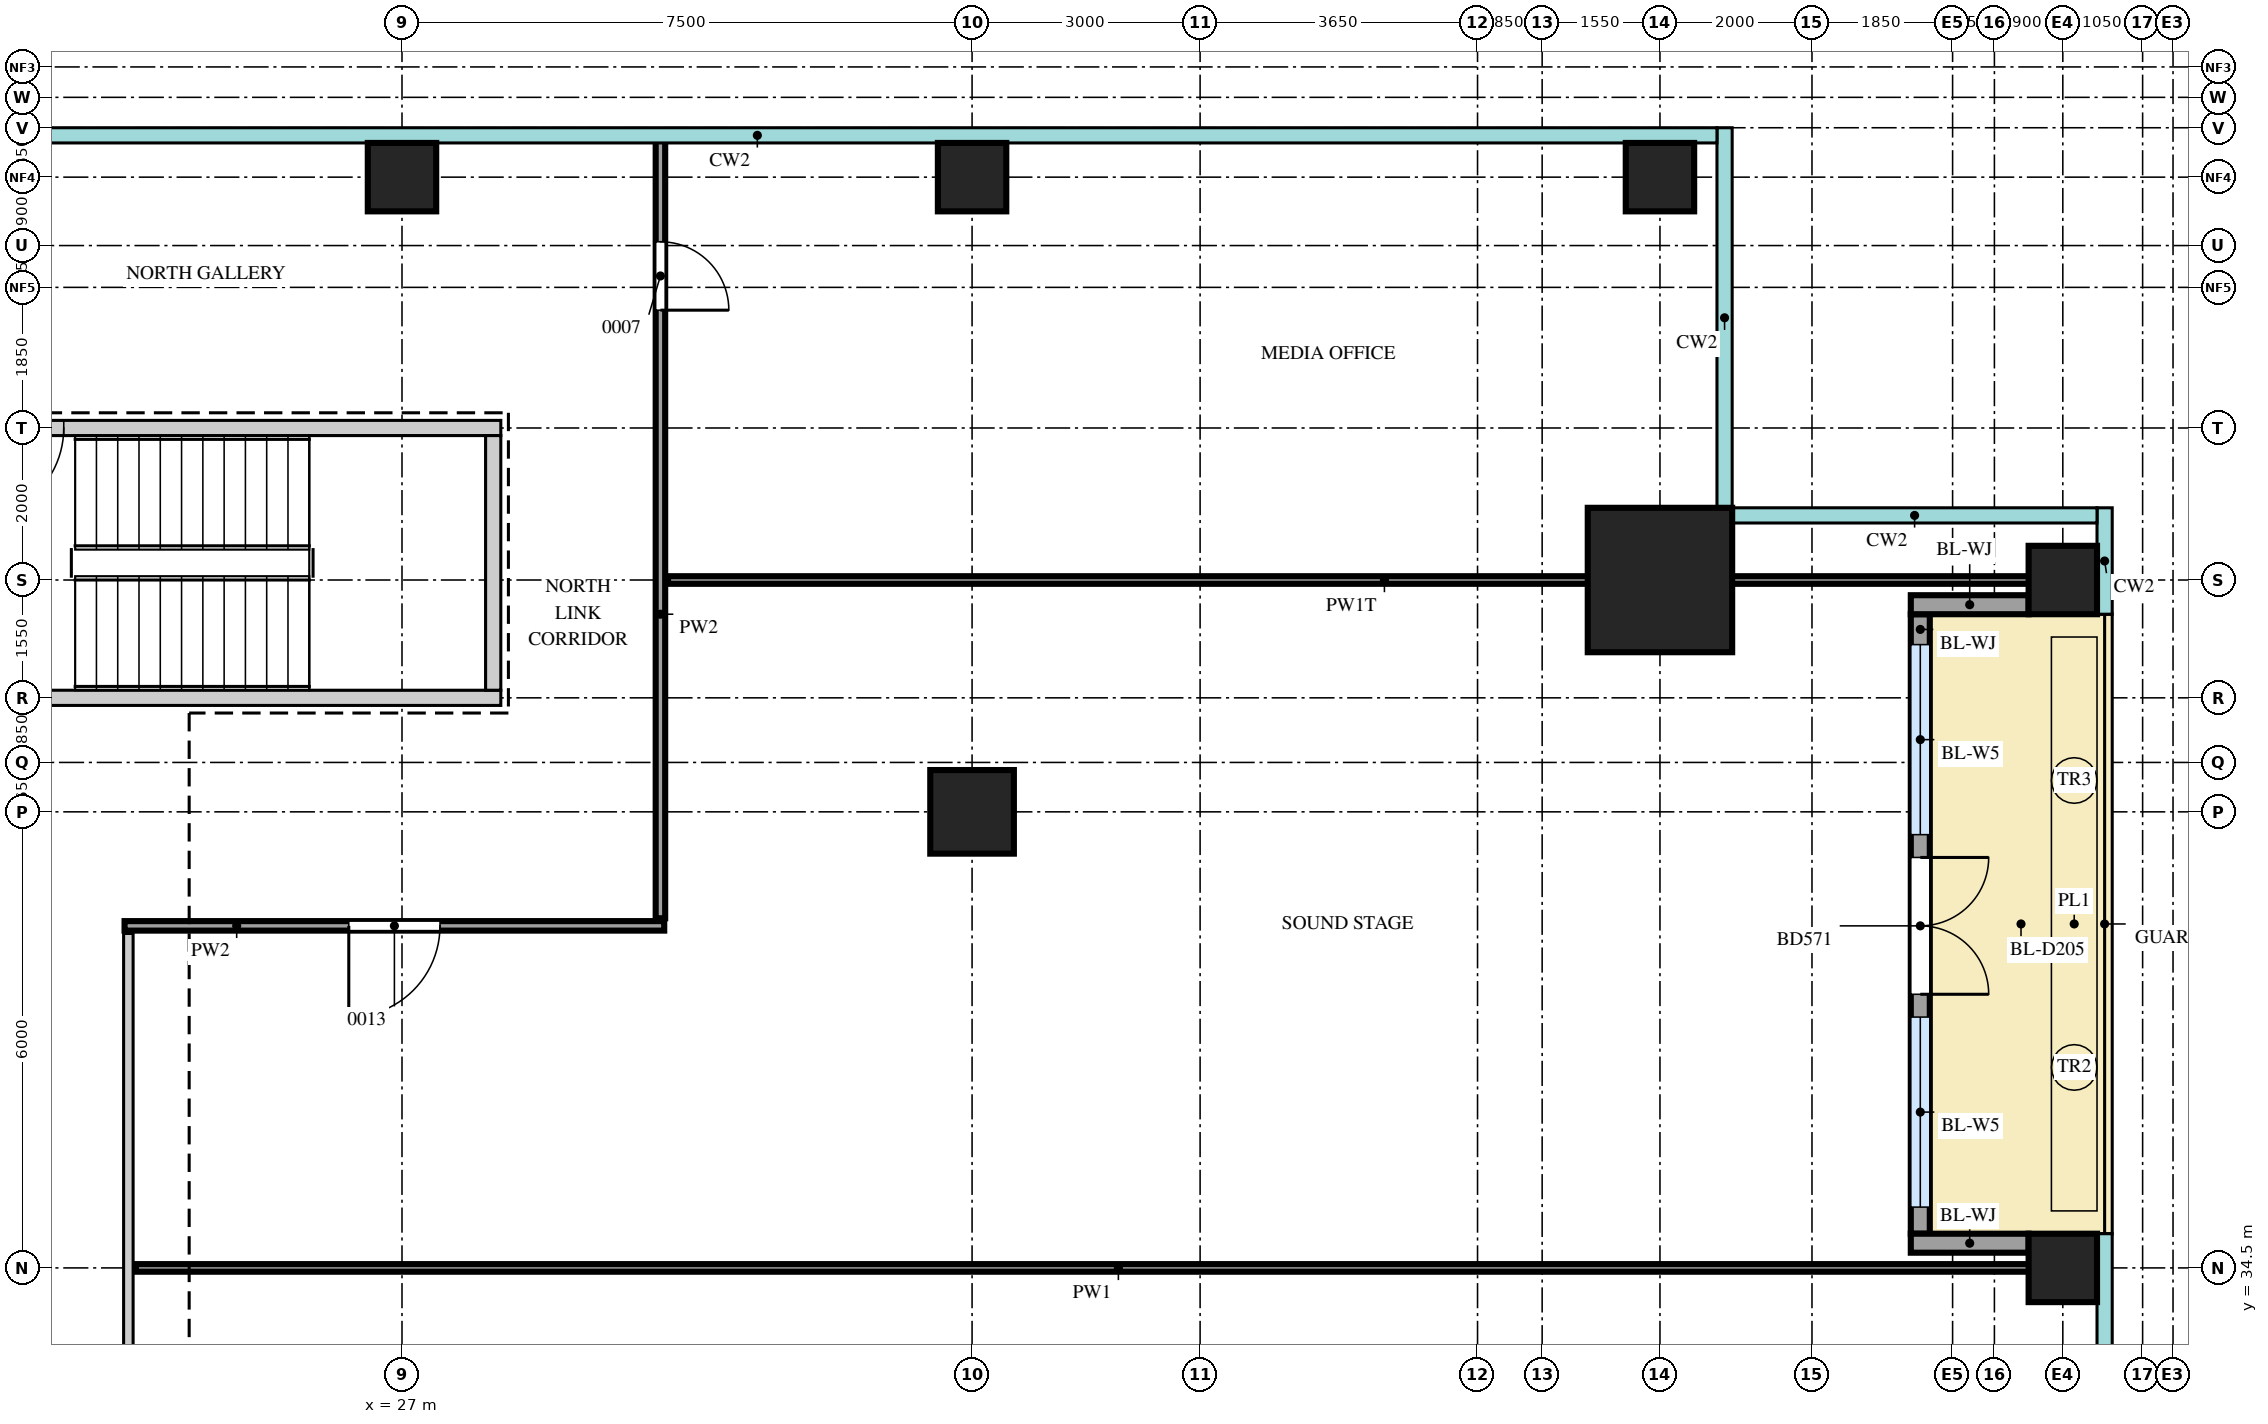
"""IFC4 building model, lengths in metres.
Left out: names, types, materials, properties, quantities, classifications, styles, units other than length and angle.
Written with IfcOpenShell. Run it as: python <this file> out.ifc"""

import sys

from ifc_helpers import new_model, si_unit, direction, frame, frame_2d, origin, origin_2d, place, context, subcontext, project, spatial, rectangle, extrude, source, transform, mapped, element, fill, save


model = new_model("IFC4")
c1 = context("Model", 3, precision=1e-05, world=origin(), true_north=direction((0.0, 1.0)))
c2 = subcontext(c1, "Body", "Model", "MODEL_VIEW")
j1 = project(units=[si_unit("LENGTHUNIT", "METRE"), si_unit("PLANEANGLEUNIT", "RADIAN")], contexts=[c1])
p1 = place(None, origin())
s1 = spatial("IfcSite", under=j1, at=p1, CompositionType="ELEMENT")
p2 = place(p1, origin())
s2 = spatial("IfcBuilding", under=s1, at=p2, CompositionType="ELEMENT")
p3 = place(p2, frame((0.0, 0.0, 254.2)))
s3 = spatial("IfcBuildingStorey", under=s2, at=p3, CompositionType="ELEMENT", Elevation=254.2)
m1 = source(origin(), c2, "Body", "SweptSolid", [
    extrude(rectangle(XDim=7.1, YDim=0.2, at=frame_2d((3.55, 0.0))), origin(), (0.0, 0.0, 1.0), 3.75),
])
p4 = place(p3, frame((21.2, 45.55, 0.0), z_axis=(0.0, 0.0, 1.0), x_axis=(1.0, 0.0, 0.0)))
e1 = element("IfcWall", 1, at=p4, inside=s3, PredefinedType="SHEAR", context=c2, shape_type="MappedRepresentation", body=[
    mapped(m1, transform((0.0, 0.0, 0.0))),
])
m2 = source(origin(), c2, "Body", "SweptSolid", [
    extrude(rectangle(XDim=1.2, YDim=2.1, at=frame_2d((0.6, 1.05))), frame((0.0, 0.11, 0.0), z_axis=(0.0, -1.0, 0.0), x_axis=(1.0, 0.0, 0.0)), (0.0, 0.0, 1.0), 0.22),
])
p5 = place(p4, frame((0.15, 0.0, 0.0)))
e2 = element("IfcOpeningElement", 2, at=p5, cuts=e1, PredefinedType="OPENING", context=c2, shape_type="MappedRepresentation", body=[
    mapped(m2, transform((0.0, 0.0, 0.0))),
])
p6 = place(p3, frame((21.2, 42.0, 0.0), z_axis=(0.0, 0.0, 1.0), x_axis=(1.0, 0.0, 0.0)))
e3 = element("IfcWall", 3, at=p6, inside=s3, PredefinedType="SHEAR", context=c2, shape_type="MappedRepresentation", body=[
    mapped(m1, transform((0.0, 0.0, 0.0))),
])
m3 = source(origin(), c2, "Body", "SweptSolid", [
    extrude(rectangle(XDim=3.35, YDim=0.2, at=frame_2d((1.675, 0.0))), origin(), (0.0, 0.0, 1.0), 3.75),
])
p7 = place(p3, frame((28.2, 42.1, 0.0), z_axis=(0.0, 0.0, 1.0), x_axis=(0.0, 1.0, 0.0)))
e4 = element("IfcWall", 4, at=p7, inside=s3, PredefinedType="SHEAR", context=c2, shape_type="MappedRepresentation", body=[
    mapped(m3, transform((0.0, 0.0, 0.0))),
])
m4 = source(origin(), c2, "Body", "SweptSolid", [
    extrude(rectangle(XDim=1.9, YDim=1.9, at=origin_2d()), origin(), (0.0, 0.0, 1.0), 4.0),
])
p8 = place(p3, frame((43.55, 43.55, 0.0), z_axis=(0.0, 0.0, 1.0), x_axis=(1.0, 0.0, 0.0)))
e5 = element("IfcColumn", 5, at=p8, inside=s3, PredefinedType="COLUMN", context=c2, shape_type="MappedRepresentation", body=[
    mapped(m4, transform((0.0, 0.0, 0.0))),
])
m5 = source(origin(), c2, "Body", "SweptSolid", [
    extrude(rectangle(XDim=0.9, YDim=0.9, at=origin_2d()), origin(), (0.0, 0.0, 1.0), 3.75),
])
for number, where, z_axis, x_axis in (
    (6, (48.85, 34.5, 0.0), (0.0, 0.0, 1.0), (1.0, 0.0, 0.0)),
    (7, (48.85, 43.55, 0.0), (0.0, 0.0, 1.0), (1.0, 0.0, 0.0)),
    (8, (27.0, 48.85, 0.0), (0.0, 0.0, 1.0), (1.0, 0.0, 0.0)),
    (9, (34.5, 48.85, 0.0), (0.0, 0.0, 1.0), (1.0, 0.0, 0.0)),
    (10, (43.55, 48.85, 0.0), (0.0, 0.0, 1.0), (1.0, 0.0, 0.0)),
):
    element("IfcColumn", number, at=place(p3, frame(where, z_axis=z_axis, x_axis=x_axis)), inside=s3, PredefinedType="COLUMN", context=c2, shape_type="MappedRepresentation", body=[
        mapped(m5, transform((0.0, 0.0, 0.0))),
    ])
m6 = source(origin(), c2, "Body", "SweptSolid", [
    extrude(rectangle(XDim=1.1, YDim=1.1, at=origin_2d()), origin(), (0.0, 0.0, 1.0), 3.75),
])
p9 = place(p3, frame((34.5, 40.5, 0.0), z_axis=(0.0, 0.0, 1.0), x_axis=(1.0, 0.0, 0.0)))
e11 = element("IfcColumn", 11, at=p9, inside=s3, PredefinedType="COLUMN", context=c2, shape_type="MappedRepresentation", body=[
    mapped(m6, transform((0.0, 0.0, 0.0))),
])
m7 = source(origin(), c2, "Body", "SweptSolid", [
    extrude(rectangle(XDim=8.15, YDim=0.25, at=frame_2d((4.075, 0.0))), origin(), (0.0, 0.0, 1.0), 3.2),
])
p10 = place(p3, frame((46.975, 34.95, 0.0), z_axis=(0.0, 0.0, 1.0), x_axis=(0.0, 1.0, 0.0)))
e12 = element("IfcWall", 12, at=p10, inside=s3, PredefinedType="SOLIDWALL", context=c2, shape_type="MappedRepresentation", body=[
    mapped(m7, transform((0.0, 0.0, 0.0))),
])
m8 = source(origin(), c2, "Body", "SweptSolid", [
    extrude(rectangle(XDim=2.5, YDim=2.4, at=frame_2d((1.25, 1.2))), frame((0.0, 0.135, 0.0), z_axis=(0.0, -1.0, 0.0), x_axis=(1.0, 0.0, 0.0)), (0.0, 0.0, 1.0), 0.27),
])
p11 = place(p10, frame((0.35, 0.0, 0.0)))
e13 = element("IfcOpeningElement", 13, at=p11, cuts=e12, PredefinedType="OPENING", context=c2, shape_type="MappedRepresentation", body=[
    mapped(m8, transform((0.0, 0.0, 0.0))),
])
p12 = place(p10, frame((5.25, 0.0, 0.0)))
e14 = element("IfcOpeningElement", 14, at=p12, cuts=e12, PredefinedType="OPENING", context=c2, shape_type="MappedRepresentation", body=[
    mapped(m8, transform((0.0, 0.0, 0.0))),
])
m9 = source(origin(), c2, "Body", "SweptSolid", [
    extrude(rectangle(XDim=1.8, YDim=2.4, at=frame_2d((0.9, 1.2))), frame((0.0, 0.135, 0.0), z_axis=(0.0, -1.0, 0.0), x_axis=(1.0, 0.0, 0.0)), (0.0, 0.0, 1.0), 0.27),
])
p13 = place(p10, frame((3.15, 0.0, 0.0)))
e15 = element("IfcOpeningElement", 15, at=p13, cuts=e12, PredefinedType="OPENING", context=c2, shape_type="MappedRepresentation", body=[
    mapped(m9, transform((0.0, 0.0, 0.0))),
])
m10 = source(origin(), c2, "Body", "SweptSolid", [
    extrude(rectangle(XDim=1.55, YDim=0.25, at=frame_2d((0.775, 0.0))), origin(), (0.0, 0.0, 1.0), 3.2),
])
for number, where, z_axis, x_axis in (
    (16, (48.4, 34.825, 0.0), (0.0, 0.0, 1.0), (-1.0, 0.0, 0.0)),
    (17, (48.4, 43.225, 0.0), (0.0, 0.0, 1.0), (-1.0, 0.0, 0.0)),
):
    element("IfcWall", number, at=place(p3, frame(where, z_axis=z_axis, x_axis=x_axis)), inside=s3, PredefinedType="SOLIDWALL", context=c2, shape_type="MappedRepresentation", body=[
        mapped(m10, transform((0.0, 0.0, 0.0))),
    ])
m11 = source(origin(), c2, "Body", "SweptSolid", [
    extrude(rectangle(XDim=20.8, YDim=0.125, at=frame_2d((10.4, 0.0))), origin(), (0.0, 0.0, 1.0), 3.8),
])
p14 = place(p3, frame((23.4, 18.1, 0.0), z_axis=(0.0, 0.0, 1.0), x_axis=(0.0, 1.0, 0.0)))
e18 = element("IfcWall", 18, at=p14, inside=s3, PredefinedType="PARTITIONING", context=c2, shape_type="MappedRepresentation", body=[
    mapped(m11, transform((0.0, 0.0, 0.0))),
])
m12 = source(origin(), c2, "Body", "SweptSolid", [
    extrude(rectangle(XDim=1.2, YDim=2.1, at=frame_2d((0.6, 1.05))), frame((0.0, 0.073, 0.0), z_axis=(0.0, -1.0, 0.0), x_axis=(1.0, 0.0, 0.0)), (0.0, 0.0, 1.0), 0.145),
])
p15 = place(p14, frame((12.05, 0.0, 0.0)))
e19 = element("IfcOpeningElement", 19, at=p15, cuts=e18, PredefinedType="OPENING", context=c2, shape_type="MappedRepresentation", body=[
    mapped(m12, transform((0.0, 0.0, 0.0))),
])
m13 = source(origin(), c2, "Body", "SweptSolid", [
    extrude(rectangle(XDim=25.85, YDim=0.1, at=frame_2d((12.925, 0.0))), origin(), (0.0, 0.0, 1.0), 3.8),
])
p16 = place(p3, frame((23.5, 34.5, 0.0), z_axis=(0.0, 0.0, 1.0), x_axis=(1.0, 0.0, 0.0)))
e20 = element("IfcWall", 20, at=p16, inside=s3, PredefinedType="PARTITIONING", context=c2, shape_type="MappedRepresentation", body=[
    mapped(m13, transform((0.0, 0.0, 0.0))),
])
m14 = source(origin(), c2, "Body", "SweptSolid", [
    extrude(rectangle(XDim=7.1, YDim=0.125, at=frame_2d((3.55, 0.0))), origin(), (0.0, 0.0, 1.0), 3.8),
])
p17 = place(p3, frame((23.35, 39.0, 0.0), z_axis=(0.0, 0.0, 1.0), x_axis=(1.0, 0.0, 0.0)))
e21 = element("IfcWall", 21, at=p17, inside=s3, PredefinedType="PARTITIONING", context=c2, shape_type="MappedRepresentation", body=[
    mapped(m14, transform((0.0, 0.0, 0.0))),
])
p18 = place(p17, frame((2.95, 0.0, 0.0)))
e22 = element("IfcOpeningElement", 22, at=p18, cuts=e21, PredefinedType="OPENING", context=c2, shape_type="MappedRepresentation", body=[
    mapped(m12, transform((0.0, 0.0, 0.0))),
])
m15 = source(origin(), c2, "Body", "SweptSolid", [
    extrude(rectangle(XDim=10.25, YDim=0.125, at=frame_2d((5.125, 0.0))), origin(), (0.0, 0.0, 1.0), 3.8),
])
p19 = place(p3, frame((30.4, 39.1, 0.0), z_axis=(0.0, 0.0, 1.0), x_axis=(0.0, 1.0, 0.0)))
e23 = element("IfcWall", 23, at=p19, inside=s3, PredefinedType="PARTITIONING", context=c2, shape_type="MappedRepresentation", body=[
    mapped(m15, transform((0.0, 0.0, 0.0))),
])
m16 = source(origin(), c2, "Body", "SweptSolid", [
    extrude(rectangle(XDim=0.9, YDim=2.1, at=frame_2d((0.45, 1.05))), frame((0.0, 0.073, 0.0), z_axis=(0.0, -1.0, 0.0), x_axis=(1.0, 0.0, 0.0)), (0.0, 0.0, 1.0), 0.145),
])
p20 = place(p19, frame((8.0, 0.0, 0.0)))
e24 = element("IfcOpeningElement", 24, at=p20, cuts=e23, PredefinedType="OPENING", context=c2, shape_type="MappedRepresentation", body=[
    mapped(m16, transform((0.0, 0.0, 0.0))),
])
m17 = source(origin(), c2, "Body", "SweptSolid", [
    extrude(rectangle(XDim=18.85, YDim=0.1, at=frame_2d((9.425, 0.0))), origin(), (0.0, 0.0, 1.0), 3.3),
])
p21 = place(p3, frame((30.5, 43.55, 0.0), z_axis=(0.0, 0.0, 1.0), x_axis=(1.0, 0.0, 0.0)))
e25 = element("IfcWall", 25, at=p21, inside=s3, PredefinedType="PARTITIONING", context=c2, shape_type="MappedRepresentation", body=[
    mapped(m17, transform((0.0, 0.0, 0.0))),
])
m18 = source(origin(), c2, "Body", "SweptSolid", [
    extrude(rectangle(XDim=2.5, YDim=2.4, at=frame_2d((1.25, 1.2))), frame((0.0, 0.03, 0.0), z_axis=(0.0, -1.0, 0.0), x_axis=(1.0, 0.0, 0.0)), (0.0, 0.0, 1.0), 0.06),
])
p22 = place(p11, origin())
e26 = element("IfcWindow", 26, at=p22, inside=s3, PartitioningType="SINGLE_PANEL", PredefinedType="WINDOW", context=c2, shape_type="MappedRepresentation", body=[
    mapped(m18, transform((0.0, 0.0, 0.0))),
])
fill(e13, e26)
p23 = place(p12, origin())
e27 = element("IfcWindow", 27, at=p23, inside=s3, PartitioningType="SINGLE_PANEL", PredefinedType="WINDOW", context=c2, shape_type="MappedRepresentation", body=[
    mapped(m18, transform((0.0, 0.0, 0.0))),
])
fill(e14, e27)
m19 = source(origin(), c2, "Body", "SweptSolid", [
    extrude(rectangle(XDim=1.8, YDim=2.4, at=frame_2d((0.9, 1.2))), frame((0.0, 0.025, 0.0), z_axis=(0.0, -1.0, 0.0), x_axis=(1.0, 0.0, 0.0)), (0.0, 0.0, 1.0), 0.05),
])
p24 = place(p13, origin())
e28 = element("IfcDoor", 28, at=p24, inside=s3, OperationType="DOUBLE_DOOR_DOUBLE_SWING", PredefinedType="DOOR", context=c2, shape_type="MappedRepresentation", body=[
    mapped(m19, transform((0.0, 0.0, 0.0))),
])
fill(e15, e28)
m20 = source(origin(), c2, "Body", "SweptSolid", [
    extrude(rectangle(XDim=1.2, YDim=2.1, at=frame_2d((0.6, 1.05))), frame((0.0, 0.025, 0.0), z_axis=(0.0, -1.0, 0.0), x_axis=(1.0, 0.0, 0.0)), (0.0, 0.0, 1.0), 0.05),
])
p25 = place(p18, origin())
e29 = element("IfcDoor", 29, at=p25, inside=s3, OperationType="SINGLE_SWING_LEFT", PredefinedType="DOOR", context=c2, shape_type="MappedRepresentation", body=[
    mapped(m20, transform((0.0, 0.0, 0.0))),
])
fill(e22, e29)
m21 = source(origin(), c2, "Body", "SweptSolid", [
    extrude(rectangle(XDim=0.9, YDim=2.1, at=frame_2d((0.45, 1.05))), frame((0.0, 0.025, 0.0), z_axis=(0.0, -1.0, 0.0), x_axis=(1.0, 0.0, 0.0)), (0.0, 0.0, 1.0), 0.05),
])
p26 = place(p20, origin())
e30 = element("IfcDoor", 30, at=p26, inside=s3, OperationType="SINGLE_SWING_LEFT", PredefinedType="DOOR", context=c2, shape_type="MappedRepresentation", body=[
    mapped(m21, transform((0.0, 0.0, 0.0))),
])
fill(e24, e30)
p27 = place(p5, origin())
e31 = element("IfcDoor", 31, at=p27, inside=s3, OperationType="SINGLE_SWING_LEFT", PredefinedType="DOOR", context=c2, shape_type="MappedRepresentation", body=[
    mapped(m20, transform((0.0, 0.0, 0.0))),
])
fill(e2, e31)
save(model, sys.argv[1])
